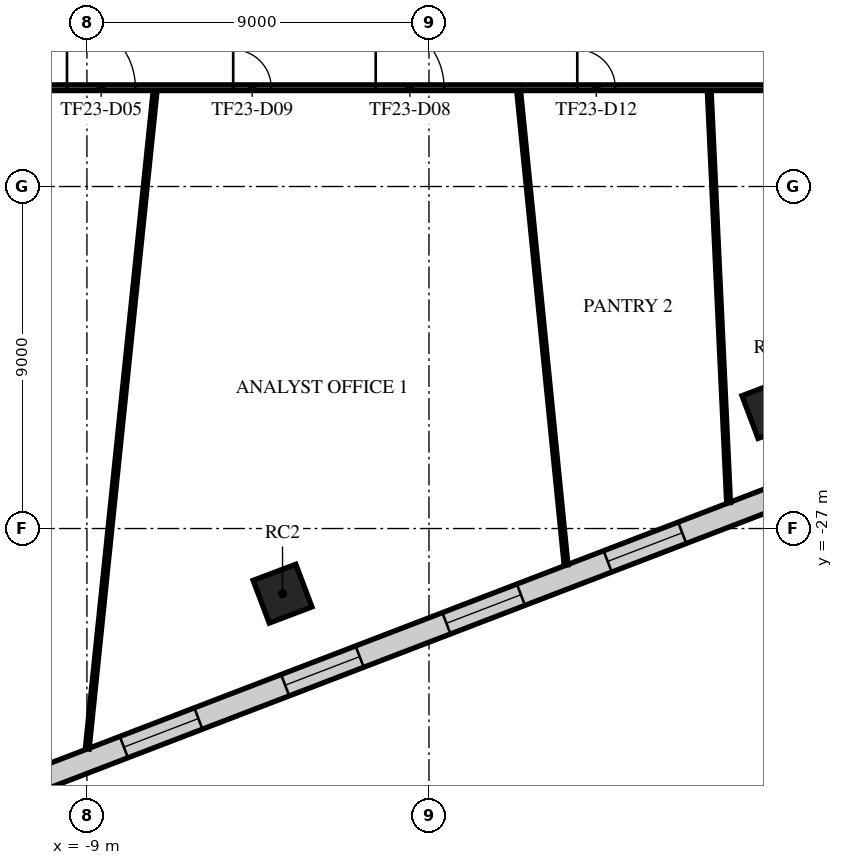
"""IFC4 building model, lengths in metres.
Left out: names, types, materials, properties, quantities, classifications, styles, units other than length and angle.
Written with IfcOpenShell. Run it as: python <this file> out.ifc"""

import sys

from ifc_helpers import new_model, si_unit, direction, frame, frame_2d, origin, origin_2d, place, context, subcontext, project, spatial, rectangle, extrude, element, fill, save


model = new_model("IFC4")
c1 = context("Model", 3, precision=1e-05, world=origin(), true_north=direction((0.0, 1.0)))
c2 = subcontext(c1, "Body", "Model", "MODEL_VIEW")
j1 = project(units=[si_unit("LENGTHUNIT", "METRE"), si_unit("PLANEANGLEUNIT", "RADIAN")], contexts=[c1])
p1 = place(None, origin())
s1 = spatial("IfcSite", under=j1, at=p1, CompositionType="ELEMENT")
p2 = place(p1, origin())
s2 = spatial("IfcBuilding", under=s1, at=p2, CompositionType="ELEMENT")
p3 = place(p2, frame((0.0, 0.0, 102.1)))
s3 = spatial("IfcBuildingStorey", under=s2, at=p3, CompositionType="ELEMENT", Elevation=102.1)
for number, where, z_axis, x_axis in (
    (1, (-3.853, -28.714, 0.0), (0.0, 0.0, 1.0), (0.935, 0.353, 0.0)),
    (2, (9.01, -23.855, 0.0), (0.0, 0.0, 1.0), (0.935, 0.353, 0.0)),
):
    element("IfcColumn", number, at=place(p3, frame(where, z_axis=z_axis, x_axis=x_axis)), inside=s3, PredefinedType="COLUMN", context=c2, shape_type="SweptSolid", body=[
        extrude(rectangle(XDim=1.2, YDim=1.2, at=origin_2d()), origin(), (0.0, 0.0, 1.0), 4.0),
    ])
p4 = place(p3, frame((-13.297, -34.775, 0.0), z_axis=(0.0, 0.0, 1.0), x_axis=(0.933580395424, 0.358368030494, 0.0)))
e3 = element("IfcWall", 3, at=p4, inside=s3, PredefinedType="STANDARD", context=c2, shape_type="SweptSolid", body=[
    extrude(rectangle(XDim=49.751, YDim=0.6, at=frame_2d((24.876, 0.0))), origin(), (0.0, 0.0, 1.0), 3.58),
])
p5 = place(p4, frame((1.161, 0.0, 0.9)))
e4 = element("IfcOpeningElement", 4, at=p5, cuts=e3, PredefinedType="OPENING", context=c2, shape_type="SweptSolid", body=[
    extrude(rectangle(XDim=2.1, YDim=2.1, at=frame_2d((1.05, 1.05))), frame((0.0, 0.31, 0.0), z_axis=(0.0, -1.0, 0.0), x_axis=(1.0, 0.0, 0.0)), (0.0, 0.0, 1.0), 0.62),
])
p6 = place(p4, frame((5.644, 0.0, 0.9)))
e5 = element("IfcOpeningElement", 5, at=p6, cuts=e3, PredefinedType="OPENING", context=c2, shape_type="SweptSolid", body=[
    extrude(rectangle(XDim=2.1, YDim=2.1, at=frame_2d((1.05, 1.05))), frame((0.0, 0.31, 0.0), z_axis=(0.0, -1.0, 0.0), x_axis=(1.0, 0.0, 0.0)), (0.0, 0.0, 1.0), 0.62),
])
p7 = place(p4, frame((10.189, 0.0, 0.9)))
e6 = element("IfcOpeningElement", 6, at=p7, cuts=e3, PredefinedType="OPENING", context=c2, shape_type="SweptSolid", body=[
    extrude(rectangle(XDim=2.1, YDim=2.1, at=frame_2d((1.05, 1.05))), frame((0.0, 0.31, 0.0), z_axis=(0.0, -1.0, 0.0), x_axis=(1.0, 0.0, 0.0)), (0.0, 0.0, 1.0), 0.62),
])
p8 = place(p4, frame((14.735, 0.0, 0.9)))
e7 = element("IfcOpeningElement", 7, at=p8, cuts=e3, PredefinedType="OPENING", context=c2, shape_type="SweptSolid", body=[
    extrude(rectangle(XDim=2.1, YDim=2.1, at=frame_2d((1.05, 1.05))), frame((0.0, 0.31, 0.0), z_axis=(0.0, -1.0, 0.0), x_axis=(1.0, 0.0, 0.0)), (0.0, 0.0, 1.0), 0.62),
])
p9 = place(p4, frame((19.28, 0.0, 0.9)))
e8 = element("IfcOpeningElement", 8, at=p9, cuts=e3, PredefinedType="OPENING", context=c2, shape_type="SweptSolid", body=[
    extrude(rectangle(XDim=2.1, YDim=2.1, at=frame_2d((1.05, 1.05))), frame((0.0, 0.31, 0.0), z_axis=(0.0, -1.0, 0.0), x_axis=(1.0, 0.0, 0.0)), (0.0, 0.0, 1.0), 0.62),
])
p10 = place(p4, frame((23.826, 0.0, 0.9)))
e9 = element("IfcOpeningElement", 9, at=p10, cuts=e3, PredefinedType="OPENING", context=c2, shape_type="SweptSolid", body=[
    extrude(rectangle(XDim=2.1, YDim=2.1, at=frame_2d((1.05, 1.05))), frame((0.0, 0.31, 0.0), z_axis=(0.0, -1.0, 0.0), x_axis=(1.0, 0.0, 0.0)), (0.0, 0.0, 1.0), 0.62),
])
p11 = place(p4, frame((28.371, 0.0, 0.9)))
e10 = element("IfcOpeningElement", 10, at=p11, cuts=e3, PredefinedType="OPENING", context=c2, shape_type="SweptSolid", body=[
    extrude(rectangle(XDim=2.1, YDim=2.1, at=frame_2d((1.05, 1.05))), frame((0.0, 0.31, 0.0), z_axis=(0.0, -1.0, 0.0), x_axis=(1.0, 0.0, 0.0)), (0.0, 0.0, 1.0), 0.62),
])
p12 = place(p4, frame((32.917, 0.0, 0.9)))
e11 = element("IfcOpeningElement", 11, at=p12, cuts=e3, PredefinedType="OPENING", context=c2, shape_type="SweptSolid", body=[
    extrude(rectangle(XDim=2.1, YDim=2.1, at=frame_2d((1.05, 1.05))), frame((0.0, 0.31, 0.0), z_axis=(0.0, -1.0, 0.0), x_axis=(1.0, 0.0, 0.0)), (0.0, 0.0, 1.0), 0.62),
])
p13 = place(p4, frame((37.462, 0.0, 0.9)))
e12 = element("IfcOpeningElement", 12, at=p13, cuts=e3, PredefinedType="OPENING", context=c2, shape_type="SweptSolid", body=[
    extrude(rectangle(XDim=2.1, YDim=2.1, at=frame_2d((1.05, 1.05))), frame((0.0, 0.31, 0.0), z_axis=(0.0, -1.0, 0.0), x_axis=(1.0, 0.0, 0.0)), (0.0, 0.0, 1.0), 0.62),
])
p14 = place(p4, frame((42.008, 0.0, 0.9)))
e13 = element("IfcOpeningElement", 13, at=p14, cuts=e3, PredefinedType="OPENING", context=c2, shape_type="SweptSolid", body=[
    extrude(rectangle(XDim=2.1, YDim=2.1, at=frame_2d((1.05, 1.05))), frame((0.0, 0.31, 0.0), z_axis=(0.0, -1.0, 0.0), x_axis=(1.0, 0.0, 0.0)), (0.0, 0.0, 1.0), 0.62),
])
p15 = place(p4, frame((46.491, 0.0, 0.9)))
e14 = element("IfcOpeningElement", 14, at=p15, cuts=e3, PredefinedType="OPENING", context=c2, shape_type="SweptSolid", body=[
    extrude(rectangle(XDim=2.1, YDim=2.1, at=frame_2d((1.05, 1.05))), frame((0.0, 0.31, 0.0), z_axis=(0.0, -1.0, 0.0), x_axis=(1.0, 0.0, 0.0)), (0.0, 0.0, 1.0), 0.62),
])
p16 = place(p3, frame((-15.325, -15.4, 0.0), z_axis=(0.0, 0.0, 1.0), x_axis=(1.0, 0.0, 0.0)))
e15 = element("IfcWall", 15, at=p16, inside=s3, PredefinedType="PARTITIONING", context=c2, shape_type="SweptSolid", body=[
    extrude(rectangle(XDim=30.725, YDim=0.15, at=frame_2d((15.362, 0.0))), origin(), (0.0, 0.0, 1.0), 3.08),
])
p17 = place(p16, frame((5.8, 0.0, 0.0)))
e16 = element("IfcOpeningElement", 16, at=p17, cuts=e15, PredefinedType="OPENING", context=c2, shape_type="SweptSolid", body=[
    extrude(rectangle(XDim=1.8, YDim=2.1, at=frame_2d((0.9, 1.05))), frame((0.0, 0.085, 0.0), z_axis=(0.0, -1.0, 0.0), x_axis=(1.0, 0.0, 0.0)), (0.0, 0.0, 1.0), 0.17),
])
p18 = place(p16, frame((13.923, 0.0, 0.0)))
e17 = element("IfcOpeningElement", 17, at=p18, cuts=e15, PredefinedType="OPENING", context=c2, shape_type="SweptSolid", body=[
    extrude(rectangle(XDim=1.8, YDim=2.1, at=frame_2d((0.9, 1.05))), frame((0.0, 0.085, 0.0), z_axis=(0.0, -1.0, 0.0), x_axis=(1.0, 0.0, 0.0)), (0.0, 0.0, 1.0), 0.17),
])
p19 = place(p16, frame((10.173, 0.0, 0.0)))
e18 = element("IfcOpeningElement", 18, at=p19, cuts=e15, PredefinedType="OPENING", context=c2, shape_type="SweptSolid", body=[
    extrude(rectangle(XDim=1.0, YDim=2.1, at=frame_2d((0.5, 1.05))), frame((0.0, 0.085, 0.0), z_axis=(0.0, -1.0, 0.0), x_axis=(1.0, 0.0, 0.0)), (0.0, 0.0, 1.0), 0.17),
])
p20 = place(p16, frame((19.227, 0.0, 0.0)))
e19 = element("IfcOpeningElement", 19, at=p20, cuts=e15, PredefinedType="OPENING", context=c2, shape_type="SweptSolid", body=[
    extrude(rectangle(XDim=1.0, YDim=2.1, at=frame_2d((0.5, 1.05))), frame((0.0, 0.085, 0.0), z_axis=(0.0, -1.0, 0.0), x_axis=(1.0, 0.0, 0.0)), (0.0, 0.0, 1.0), 0.17),
])
p21 = place(p16, frame((25.746, 0.0, 0.0)))
e20 = element("IfcOpeningElement", 20, at=p21, cuts=e15, PredefinedType="OPENING", context=c2, shape_type="SweptSolid", body=[
    extrude(rectangle(XDim=1.8, YDim=2.1, at=frame_2d((0.9, 1.05))), frame((0.0, 0.085, 0.0), z_axis=(0.0, -1.0, 0.0), x_axis=(1.0, 0.0, 0.0)), (0.0, 0.0, 1.0), 0.17),
])
p22 = place(p3, frame((-8.993, -32.799, 0.0), z_axis=(0.0, 0.0, 1.0), x_axis=(0.102654687672, 0.994717052784, 0.0)))
e21 = element("IfcWall", 21, at=p22, inside=s3, PredefinedType="PARTITIONING", context=c2, shape_type="SweptSolid", body=[
    extrude(rectangle(XDim=17.411, YDim=0.1, at=frame_2d((8.706, 0.0))), origin(), (0.0, 0.0, 1.0), 2.83),
])
p23 = place(p3, frame((2.36, -15.48, 0.0), z_axis=(0.0, 0.0, 1.0), x_axis=(0.099470960922, -0.995040465475, 0.0)))
e22 = element("IfcWall", 22, at=p23, inside=s3, PredefinedType="PARTITIONING", context=c2, shape_type="SweptSolid", body=[
    extrude(rectangle(XDim=12.544, YDim=0.1, at=frame_2d((6.272, 0.0))), origin(), (0.0, 0.0, 1.0), 2.83),
])
p24 = place(p3, frame((7.375, -15.477, 0.0), z_axis=(0.0, 0.0, 1.0), x_axis=(0.046868466971, -0.998901069578, 0.0)))
e23 = element("IfcWall", 23, at=p24, inside=s3, PredefinedType="PARTITIONING", context=c2, shape_type="SweptSolid", body=[
    extrude(rectangle(XDim=10.856, YDim=0.1, at=frame_2d((5.428, 0.0))), origin(), (0.0, 0.0, 1.0), 2.83),
])
p25 = place(p6, origin())
e24 = element("IfcWindow", 24, at=p25, inside=s3, PartitioningType="SINGLE_PANEL", PredefinedType="WINDOW", context=c2, shape_type="SweptSolid", body=[
    extrude(rectangle(XDim=2.1, YDim=2.1, at=frame_2d((1.05, 1.05))), frame((0.0, 0.03, 0.0), z_axis=(0.0, -1.0, 0.0), x_axis=(1.0, 0.0, 0.0)), (0.0, 0.0, 1.0), 0.06),
])
fill(e5, e24)
p26 = place(p7, origin())
e25 = element("IfcWindow", 25, at=p26, inside=s3, PartitioningType="SINGLE_PANEL", PredefinedType="WINDOW", context=c2, shape_type="SweptSolid", body=[
    extrude(rectangle(XDim=2.1, YDim=2.1, at=frame_2d((1.05, 1.05))), frame((0.0, 0.03, 0.0), z_axis=(0.0, -1.0, 0.0), x_axis=(1.0, 0.0, 0.0)), (0.0, 0.0, 1.0), 0.06),
])
fill(e6, e25)
p27 = place(p8, origin())
e26 = element("IfcWindow", 26, at=p27, inside=s3, PartitioningType="SINGLE_PANEL", PredefinedType="WINDOW", context=c2, shape_type="SweptSolid", body=[
    extrude(rectangle(XDim=2.1, YDim=2.1, at=frame_2d((1.05, 1.05))), frame((0.0, 0.03, 0.0), z_axis=(0.0, -1.0, 0.0), x_axis=(1.0, 0.0, 0.0)), (0.0, 0.0, 1.0), 0.06),
])
fill(e7, e26)
p28 = place(p9, origin())
e27 = element("IfcWindow", 27, at=p28, inside=s3, PartitioningType="SINGLE_PANEL", PredefinedType="WINDOW", context=c2, shape_type="SweptSolid", body=[
    extrude(rectangle(XDim=2.1, YDim=2.1, at=frame_2d((1.05, 1.05))), frame((0.0, 0.03, 0.0), z_axis=(0.0, -1.0, 0.0), x_axis=(1.0, 0.0, 0.0)), (0.0, 0.0, 1.0), 0.06),
])
fill(e8, e27)
p29 = place(p17, frame((1.8, 0.0, 0.0), z_axis=(0.0, 0.0, 1.0), x_axis=(-1.0, 0.0, 0.0)))
e28 = element("IfcDoor", 28, at=p29, inside=s3, OperationType="DOUBLE_DOOR_SINGLE_SWING", PredefinedType="DOOR", context=c2, shape_type="SweptSolid", body=[
    extrude(rectangle(XDim=1.8, YDim=2.1, at=frame_2d((0.9, 1.05))), frame((0.0, 0.025, 0.0), z_axis=(0.0, -1.0, 0.0), x_axis=(1.0, 0.0, 0.0)), (0.0, 0.0, 1.0), 0.05),
])
fill(e16, e28)
p30 = place(p18, frame((1.8, 0.0, 0.0), z_axis=(0.0, 0.0, 1.0), x_axis=(-1.0, 0.0, 0.0)))
e29 = element("IfcDoor", 29, at=p30, inside=s3, OperationType="DOUBLE_DOOR_SINGLE_SWING", PredefinedType="DOOR", context=c2, shape_type="SweptSolid", body=[
    extrude(rectangle(XDim=1.8, YDim=2.1, at=frame_2d((0.9, 1.05))), frame((0.0, 0.025, 0.0), z_axis=(0.0, -1.0, 0.0), x_axis=(1.0, 0.0, 0.0)), (0.0, 0.0, 1.0), 0.05),
])
fill(e17, e29)
p31 = place(p19, frame((1.0, 0.0, 0.0), z_axis=(0.0, 0.0, 1.0), x_axis=(-1.0, 0.0, 0.0)))
e30 = element("IfcDoor", 30, at=p31, inside=s3, OperationType="SINGLE_SWING_RIGHT", PredefinedType="DOOR", context=c2, shape_type="SweptSolid", body=[
    extrude(rectangle(XDim=1.0, YDim=2.1, at=frame_2d((0.5, 1.05))), frame((0.0, 0.025, 0.0), z_axis=(0.0, -1.0, 0.0), x_axis=(1.0, 0.0, 0.0)), (0.0, 0.0, 1.0), 0.05),
])
fill(e18, e30)
p32 = place(p20, frame((1.0, 0.0, 0.0), z_axis=(0.0, 0.0, 1.0), x_axis=(-1.0, 0.0, 0.0)))
e31 = element("IfcDoor", 31, at=p32, inside=s3, OperationType="SINGLE_SWING_LEFT", PredefinedType="DOOR", context=c2, shape_type="SweptSolid", body=[
    extrude(rectangle(XDim=1.0, YDim=2.1, at=frame_2d((0.5, 1.05))), frame((0.0, 0.025, 0.0), z_axis=(0.0, -1.0, 0.0), x_axis=(1.0, 0.0, 0.0)), (0.0, 0.0, 1.0), 0.05),
])
fill(e19, e31)
save(model, sys.argv[1])
